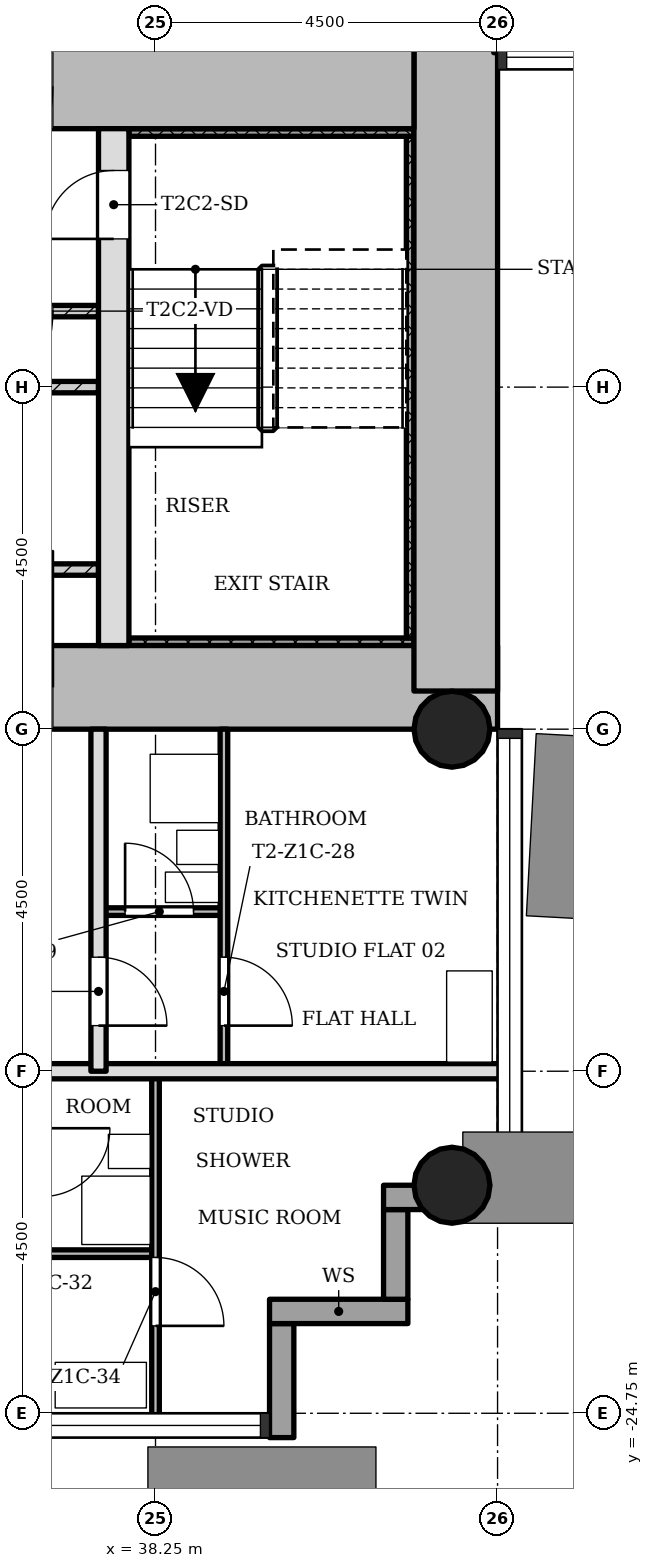
"""IFC4 building model, lengths in metres.
Left out: names, types, materials, properties, quantities, classifications, styles, units other than length and angle.
Written with IfcOpenShell. Run it as: python <this file> out.ifc"""

import sys

from ifc_helpers import new_model, si_unit, direction, frame, frame_2d, origin, origin_2d, place, context, subcontext, project, spatial, rectangle, hollow_circle, extrude, element, fill, save


model = new_model("IFC4")
c1 = context("Model", 3, precision=1e-05, world=origin(), true_north=direction((0.0, 1.0)))
c2 = subcontext(c1, "Body", "Model", "MODEL_VIEW")
j1 = project(units=[si_unit("LENGTHUNIT", "METRE"), si_unit("PLANEANGLEUNIT", "RADIAN")], contexts=[c1])
p1 = place(None, origin())
s1 = spatial("IfcSite", under=j1, at=p1, CompositionType="ELEMENT")
p2 = place(p1, origin())
s2 = spatial("IfcBuilding", under=s1, at=p2, CompositionType="ELEMENT")
p3 = place(p2, frame((0.0, 0.0, 44.9)))
s3 = spatial("IfcBuildingStorey", under=s2, at=p3, CompositionType="ELEMENT", Elevation=44.9)
p4 = place(p3, frame((30.35, -15.2, 0.0), z_axis=(0.0, 0.0, 1.0), x_axis=(1.0, 0.0, 0.0)))
e1 = element("IfcWall", 1, at=p4, inside=s3, PredefinedType="SHEAR", context=c2, shape_type="SweptSolid", body=[
    extrude(rectangle(XDim=12.4, YDim=1.1, at=frame_2d((6.2, 0.0))), origin(), (0.0, 0.0, 1.0), 3.4),
])
p5 = place(p4, frame((4.75, 0.0, 0.0)))
e2 = element("IfcOpeningElement", 2, at=p5, cuts=e1, PredefinedType="OPENING", context=c2, shape_type="SweptSolid", body=[
    extrude(rectangle(XDim=1.8, YDim=2.1, at=frame_2d((0.9, 1.05))), frame((0.0, 0.56, 0.0), z_axis=(0.0, -1.0, 0.0), x_axis=(1.0, 0.0, 0.0)), (0.0, 0.0, 1.0), 1.12),
])
p6 = place(p3, frame((42.2, -15.248, 0.0), z_axis=(0.0, 0.0, 1.0), x_axis=(0.0, 1.0, 0.0)))
e3 = element("IfcWall", 3, at=p6, inside=s3, PredefinedType="SHEAR", context=c2, shape_type="SweptSolid", body=[
    extrude(rectangle(XDim=8.596, YDim=1.1, at=frame_2d((4.298, 0.0))), origin(), (0.0, 0.0, 1.0), 3.4),
])
p7 = place(p3, frame((41.65, -7.3, 0.0), z_axis=(0.0, 0.0, 1.0), x_axis=(-1.0, 0.0, 0.0)))
e4 = element("IfcWall", 4, at=p7, inside=s3, PredefinedType="SHEAR", context=c2, shape_type="SweptSolid", body=[
    extrude(rectangle(XDim=12.4, YDim=1.1, at=frame_2d((6.2, 0.0))), origin(), (0.0, 0.0, 1.0), 3.4),
])
p8 = place(p7, frame((4.75, 0.0, 0.0)))
e5 = element("IfcOpeningElement", 5, at=p8, cuts=e4, PredefinedType="OPENING", context=c2, shape_type="SweptSolid", body=[
    extrude(rectangle(XDim=1.8, YDim=2.1, at=frame_2d((0.9, 1.05))), frame((0.0, 0.56, 0.0), z_axis=(0.0, -1.0, 0.0), x_axis=(1.0, 0.0, 0.0)), (0.0, 0.0, 1.0), 1.12),
])
p9 = place(p3, frame((37.7, -14.65, 0.0), z_axis=(0.0, 0.0, 1.0), x_axis=(0.0, 1.0, 0.0)))
e6 = element("IfcWall", 6, at=p9, inside=s3, PredefinedType="SHEAR", context=c2, shape_type="SweptSolid", body=[
    extrude(rectangle(XDim=6.8, YDim=0.4, at=frame_2d((3.4, 0.0))), origin(), (0.0, 0.0, 1.0), 3.4),
])
p10 = place(p9, frame((5.35, 0.0, 0.0)))
e7 = element("IfcOpeningElement", 7, at=p10, cuts=e6, PredefinedType="OPENING", context=c2, shape_type="SweptSolid", body=[
    extrude(rectangle(XDim=0.9, YDim=2.1, at=frame_2d((0.45, 1.05))), frame((0.0, 0.21, 0.0), z_axis=(0.0, -1.0, 0.0), x_axis=(1.0, 0.0, 0.0)), (0.0, 0.0, 1.0), 0.42),
])
for number, where, z_axis, x_axis in (
    (8, (42.15, -15.75, 0.0), (0.0, 0.0, 1.0), (1.0, 0.0, 0.0)),
    (9, (42.15, -21.75, 0.0), (0.0, 0.0, 1.0), (1.0, 0.0, 0.0)),
):
    element("IfcColumn", number, at=place(p3, frame(where, z_axis=z_axis, x_axis=x_axis)), inside=s3, PredefinedType="COLUMN", context=c2, shape_type="SweptSolid", body=[
        extrude(hollow_circle(Radius=0.5, WallThickness=0.036, at=origin_2d()), origin(), (0.0, 0.0, 1.0), 3.4),
    ])
p11 = place(p3, frame((39.91, -25.07, -0.3), z_axis=(0.0, 0.0, 1.0), x_axis=(0.0, 1.0, 0.0)))
e10 = element("IfcWall", 10, at=p11, inside=s3, PredefinedType="STANDARD", context=c2, shape_type="SweptSolid", body=[
    extrude(rectangle(XDim=1.5, YDim=0.32, at=frame_2d((0.75, 0.0))), origin(), (0.0, 0.0, 1.0), 3.4),
])
p12 = place(p3, frame((39.75, -23.41, -0.3), z_axis=(0.0, 0.0, 1.0), x_axis=(1.0, 0.0, 0.0)))
e11 = element("IfcWall", 11, at=p12, inside=s3, PredefinedType="STANDARD", context=c2, shape_type="SweptSolid", body=[
    extrude(rectangle(XDim=1.82, YDim=0.32, at=frame_2d((0.91, 0.0))), origin(), (0.0, 0.0, 1.0), 3.4),
])
p13 = place(p3, frame((41.41, -23.25, -0.3), z_axis=(0.0, 0.0, 1.0), x_axis=(0.0, 1.0, 0.0)))
e12 = element("IfcWall", 12, at=p13, inside=s3, PredefinedType="STANDARD", context=c2, shape_type="SweptSolid", body=[
    extrude(rectangle(XDim=1.18, YDim=0.32, at=frame_2d((0.59, 0.0))), origin(), (0.0, 0.0, 1.0), 3.4),
])
p14 = place(p3, frame((41.25, -21.91, -0.3), z_axis=(0.0, 0.0, 1.0), x_axis=(1.0, 0.0, 0.0)))
e13 = element("IfcWall", 13, at=p14, inside=s3, PredefinedType="STANDARD", context=c2, shape_type="SweptSolid", body=[
    extrude(rectangle(XDim=1.82, YDim=0.32, at=frame_2d((0.91, 0.0))), origin(), (0.0, 0.0, 1.0), 3.4),
])
p15 = place(p3, frame((34.5, -10.25, 0.0), z_axis=(0.0, 0.0, 1.0), x_axis=(1.0, 0.0, 0.0)))
e14 = element("IfcWall", 14, at=p15, inside=s3, PredefinedType="PARTITIONING", context=c2, shape_type="SweptSolid", body=[
    extrude(rectangle(XDim=3.0, YDim=0.15, at=frame_2d((1.5, 0.0))), origin(), (0.0, 0.0, 1.0), 3.0),
])
p16 = place(p15, frame((0.6, 0.0, 0.0)))
e15 = element("IfcOpeningElement", 15, at=p16, cuts=e14, PredefinedType="OPENING", context=c2, shape_type="SweptSolid", body=[
    extrude(rectangle(XDim=1.8, YDim=2.1, at=frame_2d((0.9, 1.05))), frame((0.0, 0.085, 0.0), z_axis=(0.0, -1.0, 0.0), x_axis=(1.0, 0.0, 0.0)), (0.0, 0.0, 1.0), 0.17),
])
for number, where, z_axis, x_axis in (
    (16, (36.3, -11.25, 0.0), (0.0, 0.0, 1.0), (1.0, 0.0, 0.0)),
    (17, (36.3, -13.65, 0.0), (0.0, 0.0, 1.0), (1.0, 0.0, 0.0)),
):
    element("IfcWall", number, at=place(p3, frame(where, z_axis=z_axis, x_axis=x_axis)), inside=s3, PredefinedType="PARTITIONING", context=c2, shape_type="SweptSolid", body=[
        extrude(rectangle(XDim=1.2, YDim=0.15, at=frame_2d((0.6, 0.0))), origin(), (0.0, 0.0, 1.0), 3.0),
    ])
p17 = place(p3, frame((38.25, -22.65, 0.0), z_axis=(0.0, 0.0, 1.0), x_axis=(-1.0, 0.0, 0.0)))
e18 = element("IfcWall", 18, at=p17, inside=s3, PredefinedType="PARTITIONING", context=c2, shape_type="SweptSolid", body=[
    extrude(rectangle(XDim=1.5, YDim=0.1, at=frame_2d((0.75, 0.0))), origin(), (0.0, 0.0, 1.0), 3.0),
])
p18 = place(p3, frame((42.85, -20.25, 0.0), z_axis=(0.0, 0.0, 1.0), x_axis=(-1.0, 0.0, 0.0)))
e19 = element("IfcWall", 19, at=p18, inside=s3, PredefinedType="SOLIDWALL", context=c2, shape_type="SweptSolid", body=[
    extrude(rectangle(XDim=13.7, YDim=0.2, at=frame_2d((6.85, 0.0))), origin(), (0.0, 0.0, 1.0), 3.0),
])
p19 = place(p18, frame((6.4, 0.0, 0.0)))
e20 = element("IfcOpeningElement", 20, at=p19, cuts=e19, PredefinedType="OPENING", context=c2, shape_type="SweptSolid", body=[
    extrude(rectangle(XDim=0.9, YDim=2.1, at=frame_2d((0.45, 1.05))), frame((0.0, 0.11, 0.0), z_axis=(0.0, -1.0, 0.0), x_axis=(1.0, 0.0, 0.0)), (0.0, 0.0, 1.0), 0.22),
])
p20 = place(p3, frame((39.15, -18.15, 0.0), z_axis=(0.0, 0.0, 1.0), x_axis=(-1.0, 0.0, 0.0)))
e21 = element("IfcWall", 21, at=p20, inside=s3, PredefinedType="PARTITIONING", context=c2, shape_type="SweptSolid", body=[
    extrude(rectangle(XDim=1.65, YDim=0.1, at=frame_2d((0.825, 0.0))), origin(), (0.0, 0.0, 1.0), 3.0),
])
p21 = place(p20, frame((0.4, 0.0, 0.0)))
e22 = element("IfcOpeningElement", 22, at=p21, cuts=e21, PredefinedType="OPENING", context=c2, shape_type="SweptSolid", body=[
    extrude(rectangle(XDim=0.9, YDim=2.1, at=frame_2d((0.45, 1.05))), frame((0.0, 0.06, 0.0), z_axis=(0.0, -1.0, 0.0), x_axis=(1.0, 0.0, 0.0)), (0.0, 0.0, 1.0), 0.12),
])
p22 = place(p3, frame((39.15, -20.25, 0.0), z_axis=(0.0, 0.0, 1.0), x_axis=(0.0, 1.0, 0.0)))
e23 = element("IfcWall", 23, at=p22, inside=s3, PredefinedType="PARTITIONING", context=c2, shape_type="SweptSolid", body=[
    extrude(rectangle(XDim=4.5, YDim=0.1, at=frame_2d((2.25, 0.0))), origin(), (0.0, 0.0, 1.0), 3.0),
])
p23 = place(p22, frame((0.6, 0.0, 0.0)))
e24 = element("IfcOpeningElement", 24, at=p23, cuts=e23, PredefinedType="OPENING", context=c2, shape_type="SweptSolid", body=[
    extrude(rectangle(XDim=0.9, YDim=2.1, at=frame_2d((0.45, 1.05))), frame((0.0, 0.06, 0.0), z_axis=(0.0, -1.0, 0.0), x_axis=(1.0, 0.0, 0.0)), (0.0, 0.0, 1.0), 0.12),
])
p24 = place(p3, frame((38.25, -24.85, 0.0), z_axis=(0.0, 0.0, 1.0), x_axis=(0.0, 1.0, 0.0)))
e25 = element("IfcWall", 25, at=p24, inside=s3, PredefinedType="PARTITIONING", context=c2, shape_type="SweptSolid", body=[
    extrude(rectangle(XDim=4.6, YDim=0.1, at=frame_2d((2.3, 0.0))), origin(), (0.0, 0.0, 1.0), 3.0),
])
p25 = place(p24, frame((1.25, 0.0, 0.0)))
e26 = element("IfcOpeningElement", 26, at=p25, cuts=e25, PredefinedType="OPENING", context=c2, shape_type="SweptSolid", body=[
    extrude(rectangle(XDim=0.9, YDim=2.1, at=frame_2d((0.45, 1.05))), frame((0.0, 0.06, 0.0), z_axis=(0.0, -1.0, 0.0), x_axis=(1.0, 0.0, 0.0)), (0.0, 0.0, 1.0), 0.12),
])
p26 = place(p3, frame((37.5, -20.25, 0.0), z_axis=(0.0, 0.0, 1.0), x_axis=(0.0, 1.0, 0.0)))
e27 = element("IfcWall", 27, at=p26, inside=s3, PredefinedType="SOLIDWALL", context=c2, shape_type="SweptSolid", body=[
    extrude(rectangle(XDim=4.5, YDim=0.2, at=frame_2d((2.25, 0.0))), origin(), (0.0, 0.0, 1.0), 3.0),
])
p27 = place(p26, frame((0.6, 0.0, 0.0)))
e28 = element("IfcOpeningElement", 28, at=p27, cuts=e27, PredefinedType="OPENING", context=c2, shape_type="SweptSolid", body=[
    extrude(rectangle(XDim=0.9, YDim=2.1, at=frame_2d((0.45, 1.05))), frame((0.0, 0.11, 0.0), z_axis=(0.0, -1.0, 0.0), x_axis=(1.0, 0.0, 0.0)), (0.0, 0.0, 1.0), 0.22),
])
p28 = place(p3, frame((37.9, -14.6, 0.0), z_axis=(0.0, 0.0, 1.0), x_axis=(1.0, 0.0, 0.0)))
e29 = element("IfcWall", 29, at=p28, inside=s3, PredefinedType="SHEAR", context=c2, shape_type="SweptSolid", body=[
    extrude(rectangle(XDim=3.75, YDim=0.1, at=frame_2d((1.875, 0.0))), origin(), (0.0, 0.0, 1.0), 3.4),
])
p29 = place(p3, frame((41.6, -7.95, 0.0), z_axis=(0.0, 0.0, 1.0), x_axis=(0.0, -1.0, 0.0)))
e30 = element("IfcWall", 30, at=p29, inside=s3, PredefinedType="SHEAR", context=c2, shape_type="SweptSolid", body=[
    extrude(rectangle(XDim=6.6, YDim=0.1, at=frame_2d((3.3, 0.0))), origin(), (0.0, 0.0, 1.0), 3.4),
])
p30 = place(p3, frame((37.9, -7.9, 0.0), z_axis=(0.0, 0.0, 1.0), x_axis=(1.0, 0.0, 0.0)))
e31 = element("IfcWall", 31, at=p30, inside=s3, PredefinedType="SHEAR", context=c2, shape_type="SweptSolid", body=[
    extrude(rectangle(XDim=3.75, YDim=0.1, at=frame_2d((1.875, 0.0))), origin(), (0.0, 0.0, 1.0), 3.4),
])
p31 = place(p16, origin())
e32 = element("IfcDoor", 32, at=p31, inside=s3, OperationType="SINGLE_SWING_LEFT", PredefinedType="DOOR", context=c2, shape_type="SweptSolid", body=[
    extrude(rectangle(XDim=1.8, YDim=2.1, at=frame_2d((0.9, 1.05))), frame((0.0, 0.025, 0.0), z_axis=(0.0, -1.0, 0.0), x_axis=(1.0, 0.0, 0.0)), (0.0, 0.0, 1.0), 0.05),
])
fill(e15, e32)
p32 = place(p27, origin())
e33 = element("IfcDoor", 33, at=p32, inside=s3, OperationType="SINGLE_SWING_LEFT", PredefinedType="DOOR", context=c2, shape_type="SweptSolid", body=[
    extrude(rectangle(XDim=0.9, YDim=2.1, at=frame_2d((0.45, 1.05))), frame((0.0, 0.025, 0.0), z_axis=(0.0, -1.0, 0.0), x_axis=(1.0, 0.0, 0.0)), (0.0, 0.0, 1.0), 0.05),
])
fill(e28, e33)
p33 = place(p23, origin())
e34 = element("IfcDoor", 34, at=p33, inside=s3, OperationType="SINGLE_SWING_LEFT", PredefinedType="DOOR", context=c2, shape_type="SweptSolid", body=[
    extrude(rectangle(XDim=0.9, YDim=2.1, at=frame_2d((0.45, 1.05))), frame((0.0, 0.025, 0.0), z_axis=(0.0, -1.0, 0.0), x_axis=(1.0, 0.0, 0.0)), (0.0, 0.0, 1.0), 0.05),
])
fill(e24, e34)
p34 = place(p21, origin())
e35 = element("IfcDoor", 35, at=p34, inside=s3, OperationType="SINGLE_SWING_RIGHT", PredefinedType="DOOR", context=c2, shape_type="SweptSolid", body=[
    extrude(rectangle(XDim=0.9, YDim=2.1, at=frame_2d((0.45, 1.05))), frame((0.0, 0.025, 0.0), z_axis=(0.0, -1.0, 0.0), x_axis=(1.0, 0.0, 0.0)), (0.0, 0.0, 1.0), 0.05),
])
fill(e22, e35)
p35 = place(p25, origin())
e36 = element("IfcDoor", 36, at=p35, inside=s3, OperationType="SINGLE_SWING_LEFT", PredefinedType="DOOR", context=c2, shape_type="SweptSolid", body=[
    extrude(rectangle(XDim=0.9, YDim=2.1, at=frame_2d((0.45, 1.05))), frame((0.0, 0.025, 0.0), z_axis=(0.0, -1.0, 0.0), x_axis=(1.0, 0.0, 0.0)), (0.0, 0.0, 1.0), 0.05),
])
fill(e26, e36)
p36 = place(p10, origin())
e37 = element("IfcDoor", 37, at=p36, inside=s3, OperationType="SINGLE_SWING_RIGHT", PredefinedType="DOOR", context=c2, shape_type="SweptSolid", body=[
    extrude(rectangle(XDim=0.9, YDim=2.1, at=frame_2d((0.45, 1.05))), frame((0.0, 0.025, 0.0), z_axis=(0.0, -1.0, 0.0), x_axis=(1.0, 0.0, 0.0)), (0.0, 0.0, 1.0), 0.05),
])
fill(e7, e37)
p37 = place(p8, origin())
e38 = element("IfcDoor", 38, at=p37, inside=s3, OperationType="SINGLE_SWING_LEFT", PredefinedType="DOOR", context=c2, shape_type="SweptSolid", body=[
    extrude(rectangle(XDim=1.8, YDim=2.1, at=frame_2d((0.9, 1.05))), frame((0.0, 0.025, 0.0), z_axis=(0.0, -1.0, 0.0), x_axis=(1.0, 0.0, 0.0)), (0.0, 0.0, 1.0), 0.05),
])
fill(e5, e38)
p38 = place(p5, origin())
e39 = element("IfcDoor", 39, at=p38, inside=s3, OperationType="SINGLE_SWING_LEFT", PredefinedType="DOOR", context=c2, shape_type="SweptSolid", body=[
    extrude(rectangle(XDim=1.8, YDim=2.1, at=frame_2d((0.9, 1.05))), frame((0.0, 0.025, 0.0), z_axis=(0.0, -1.0, 0.0), x_axis=(1.0, 0.0, 0.0)), (0.0, 0.0, 1.0), 0.05),
])
fill(e2, e39)
save(model, sys.argv[1])
